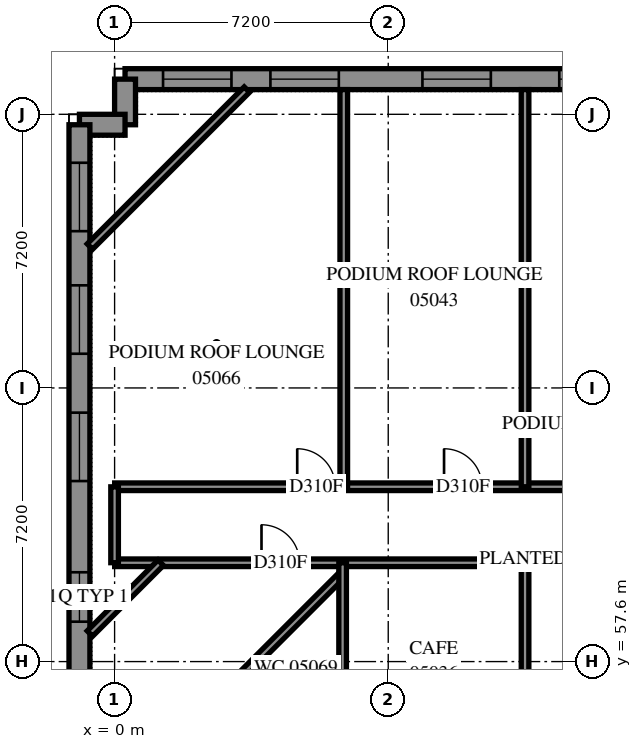
"""IFC4 building model, lengths in metres.
Left out: names, types, materials, properties, quantities, classifications, styles, units other than length and angle.
Written with IfcOpenShell. Run it as: python <this file> out.ifc"""

import sys

from ifc_helpers import new_model, si_unit, direction, frame, frame_2d, origin, place, context, subcontext, project, spatial, polyline, rectangle, outline, extrude, element, fill, save


model = new_model("IFC4")
c1 = context("Model", 3, precision=1e-05, world=origin(), true_north=direction((0.0, 1.0)))
c2 = subcontext(c1, "Body", "Model", "MODEL_VIEW")
j1 = project(units=[si_unit("LENGTHUNIT", "METRE"), si_unit("PLANEANGLEUNIT", "RADIAN")], contexts=[c1])
p1 = place(None, origin())
s1 = spatial("IfcSite", under=j1, at=p1, CompositionType="ELEMENT")
p2 = place(p1, origin())
s2 = spatial("IfcBuilding", under=s1, at=p2, CompositionType="ELEMENT")
p3 = place(p2, frame((0.0, 0.0, 22.8)))
s3 = spatial("IfcBuildingStorey", under=s2, at=p3, CompositionType="ELEMENT", Elevation=22.8)
p4 = place(p3, frame((79.583, 72.925, 0.0), z_axis=(0.0, 0.0, 1.0), x_axis=(-1.0, 0.0, 0.0)))
e1 = element("IfcWall", 1, at=p4, inside=s3, PredefinedType="SOLIDWALL", context=c2, shape_type="SweptSolid", body=[
    extrude(outline(polyline([(-0.114, -0.275), (79.583, -0.275), (79.033, 0.275), (0.114, 0.275), (-0.114, -0.275)])), origin(), (0.0, 0.0, 1.0), 3.9),
])
p5 = place(p4, frame((1.249, 0.0, 0.7)))
e2 = element("IfcOpeningElement", 2, at=p5, cuts=e1, PredefinedType="OPENING", context=c2, shape_type="SweptSolid", body=[
    extrude(rectangle(XDim=1.8, YDim=2.4, at=frame_2d((0.9, 1.2))), frame((0.0, 0.285, 0.0), z_axis=(0.0, -1.0, 0.0), x_axis=(1.0, 0.0, 0.0)), (0.0, 0.0, 1.0), 0.57),
])
p6 = place(p4, frame((4.883, 0.0, 0.7)))
e3 = element("IfcOpeningElement", 3, at=p6, cuts=e1, PredefinedType="OPENING", context=c2, shape_type="SweptSolid", body=[
    extrude(rectangle(XDim=1.8, YDim=2.4, at=frame_2d((0.9, 1.2))), frame((0.0, 0.285, 0.0), z_axis=(0.0, -1.0, 0.0), x_axis=(1.0, 0.0, 0.0)), (0.0, 0.0, 1.0), 0.57),
])
p7 = place(p4, frame((8.483, 0.0, 0.7)))
e4 = element("IfcOpeningElement", 4, at=p7, cuts=e1, PredefinedType="OPENING", context=c2, shape_type="SweptSolid", body=[
    extrude(rectangle(XDim=1.8, YDim=2.4, at=frame_2d((0.9, 1.2))), frame((0.0, 0.285, 0.0), z_axis=(0.0, -1.0, 0.0), x_axis=(1.0, 0.0, 0.0)), (0.0, 0.0, 1.0), 0.57),
])
p8 = place(p4, frame((12.083, 0.0, 0.7)))
e5 = element("IfcOpeningElement", 5, at=p8, cuts=e1, PredefinedType="OPENING", context=c2, shape_type="SweptSolid", body=[
    extrude(rectangle(XDim=1.8, YDim=2.4, at=frame_2d((0.9, 1.2))), frame((0.0, 0.285, 0.0), z_axis=(0.0, -1.0, 0.0), x_axis=(1.0, 0.0, 0.0)), (0.0, 0.0, 1.0), 0.57),
])
p9 = place(p4, frame((15.683, 0.0, 0.7)))
e6 = element("IfcOpeningElement", 6, at=p9, cuts=e1, PredefinedType="OPENING", context=c2, shape_type="SweptSolid", body=[
    extrude(rectangle(XDim=1.8, YDim=2.4, at=frame_2d((0.9, 1.2))), frame((0.0, 0.285, 0.0), z_axis=(0.0, -1.0, 0.0), x_axis=(1.0, 0.0, 0.0)), (0.0, 0.0, 1.0), 0.57),
])
p10 = place(p4, frame((19.283, 0.0, 0.7)))
e7 = element("IfcOpeningElement", 7, at=p10, cuts=e1, PredefinedType="OPENING", context=c2, shape_type="SweptSolid", body=[
    extrude(rectangle(XDim=1.8, YDim=2.4, at=frame_2d((0.9, 1.2))), frame((0.0, 0.285, 0.0), z_axis=(0.0, -1.0, 0.0), x_axis=(1.0, 0.0, 0.0)), (0.0, 0.0, 1.0), 0.57),
])
p11 = place(p4, frame((22.883, 0.0, 0.7)))
e8 = element("IfcOpeningElement", 8, at=p11, cuts=e1, PredefinedType="OPENING", context=c2, shape_type="SweptSolid", body=[
    extrude(rectangle(XDim=1.8, YDim=2.4, at=frame_2d((0.9, 1.2))), frame((0.0, 0.285, 0.0), z_axis=(0.0, -1.0, 0.0), x_axis=(1.0, 0.0, 0.0)), (0.0, 0.0, 1.0), 0.57),
])
p12 = place(p4, frame((26.483, 0.0, 0.7)))
e9 = element("IfcOpeningElement", 9, at=p12, cuts=e1, PredefinedType="OPENING", context=c2, shape_type="SweptSolid", body=[
    extrude(rectangle(XDim=1.8, YDim=2.4, at=frame_2d((0.9, 1.2))), frame((0.0, 0.285, 0.0), z_axis=(0.0, -1.0, 0.0), x_axis=(1.0, 0.0, 0.0)), (0.0, 0.0, 1.0), 0.57),
])
p13 = place(p4, frame((30.083, 0.0, 0.7)))
e10 = element("IfcOpeningElement", 10, at=p13, cuts=e1, PredefinedType="OPENING", context=c2, shape_type="SweptSolid", body=[
    extrude(rectangle(XDim=1.8, YDim=2.4, at=frame_2d((0.9, 1.2))), frame((0.0, 0.285, 0.0), z_axis=(0.0, -1.0, 0.0), x_axis=(1.0, 0.0, 0.0)), (0.0, 0.0, 1.0), 0.57),
])
p14 = place(p4, frame((33.683, 0.0, 0.7)))
e11 = element("IfcOpeningElement", 11, at=p14, cuts=e1, PredefinedType="OPENING", context=c2, shape_type="SweptSolid", body=[
    extrude(rectangle(XDim=1.8, YDim=2.4, at=frame_2d((0.9, 1.2))), frame((0.0, 0.285, 0.0), z_axis=(0.0, -1.0, 0.0), x_axis=(1.0, 0.0, 0.0)), (0.0, 0.0, 1.0), 0.57),
])
p15 = place(p4, frame((37.283, 0.0, 0.7)))
e12 = element("IfcOpeningElement", 12, at=p15, cuts=e1, PredefinedType="OPENING", context=c2, shape_type="SweptSolid", body=[
    extrude(rectangle(XDim=1.8, YDim=2.4, at=frame_2d((0.9, 1.2))), frame((0.0, 0.285, 0.0), z_axis=(0.0, -1.0, 0.0), x_axis=(1.0, 0.0, 0.0)), (0.0, 0.0, 1.0), 0.57),
])
p16 = place(p4, frame((40.883, 0.0, 0.7)))
e13 = element("IfcOpeningElement", 13, at=p16, cuts=e1, PredefinedType="OPENING", context=c2, shape_type="SweptSolid", body=[
    extrude(rectangle(XDim=1.8, YDim=2.4, at=frame_2d((0.9, 1.2))), frame((0.0, 0.285, 0.0), z_axis=(0.0, -1.0, 0.0), x_axis=(1.0, 0.0, 0.0)), (0.0, 0.0, 1.0), 0.57),
])
p17 = place(p4, frame((44.483, 0.0, 0.7)))
e14 = element("IfcOpeningElement", 14, at=p17, cuts=e1, PredefinedType="OPENING", context=c2, shape_type="SweptSolid", body=[
    extrude(rectangle(XDim=1.8, YDim=2.4, at=frame_2d((0.9, 1.2))), frame((0.0, 0.285, 0.0), z_axis=(0.0, -1.0, 0.0), x_axis=(1.0, 0.0, 0.0)), (0.0, 0.0, 1.0), 0.57),
])
p18 = place(p4, frame((48.083, 0.0, 0.7)))
e15 = element("IfcOpeningElement", 15, at=p18, cuts=e1, PredefinedType="OPENING", context=c2, shape_type="SweptSolid", body=[
    extrude(rectangle(XDim=1.8, YDim=2.4, at=frame_2d((0.9, 1.2))), frame((0.0, 0.285, 0.0), z_axis=(0.0, -1.0, 0.0), x_axis=(1.0, 0.0, 0.0)), (0.0, 0.0, 1.0), 0.57),
])
p19 = place(p4, frame((51.683, 0.0, 0.7)))
e16 = element("IfcOpeningElement", 16, at=p19, cuts=e1, PredefinedType="OPENING", context=c2, shape_type="SweptSolid", body=[
    extrude(rectangle(XDim=1.8, YDim=2.4, at=frame_2d((0.9, 1.2))), frame((0.0, 0.285, 0.0), z_axis=(0.0, -1.0, 0.0), x_axis=(1.0, 0.0, 0.0)), (0.0, 0.0, 1.0), 0.57),
])
p20 = place(p4, frame((55.283, 0.0, 0.7)))
e17 = element("IfcOpeningElement", 17, at=p20, cuts=e1, PredefinedType="OPENING", context=c2, shape_type="SweptSolid", body=[
    extrude(rectangle(XDim=1.8, YDim=2.4, at=frame_2d((0.9, 1.2))), frame((0.0, 0.285, 0.0), z_axis=(0.0, -1.0, 0.0), x_axis=(1.0, 0.0, 0.0)), (0.0, 0.0, 1.0), 0.57),
])
p21 = place(p4, frame((58.883, 0.0, 0.7)))
e18 = element("IfcOpeningElement", 18, at=p21, cuts=e1, PredefinedType="OPENING", context=c2, shape_type="SweptSolid", body=[
    extrude(rectangle(XDim=1.8, YDim=2.4, at=frame_2d((0.9, 1.2))), frame((0.0, 0.285, 0.0), z_axis=(0.0, -1.0, 0.0), x_axis=(1.0, 0.0, 0.0)), (0.0, 0.0, 1.0), 0.57),
])
p22 = place(p4, frame((62.483, 0.0, 0.7)))
e19 = element("IfcOpeningElement", 19, at=p22, cuts=e1, PredefinedType="OPENING", context=c2, shape_type="SweptSolid", body=[
    extrude(rectangle(XDim=1.8, YDim=2.4, at=frame_2d((0.9, 1.2))), frame((0.0, 0.285, 0.0), z_axis=(0.0, -1.0, 0.0), x_axis=(1.0, 0.0, 0.0)), (0.0, 0.0, 1.0), 0.57),
])
p23 = place(p4, frame((66.083, 0.0, 0.7)))
e20 = element("IfcOpeningElement", 20, at=p23, cuts=e1, PredefinedType="OPENING", context=c2, shape_type="SweptSolid", body=[
    extrude(rectangle(XDim=1.8, YDim=2.4, at=frame_2d((0.9, 1.2))), frame((0.0, 0.285, 0.0), z_axis=(0.0, -1.0, 0.0), x_axis=(1.0, 0.0, 0.0)), (0.0, 0.0, 1.0), 0.57),
])
p24 = place(p4, frame((69.683, 0.0, 0.7)))
e21 = element("IfcOpeningElement", 21, at=p24, cuts=e1, PredefinedType="OPENING", context=c2, shape_type="SweptSolid", body=[
    extrude(rectangle(XDim=1.8, YDim=2.4, at=frame_2d((0.9, 1.2))), frame((0.0, 0.285, 0.0), z_axis=(0.0, -1.0, 0.0), x_axis=(1.0, 0.0, 0.0)), (0.0, 0.0, 1.0), 0.57),
])
p25 = place(p4, frame((73.683, 0.0, 0.7)))
e22 = element("IfcOpeningElement", 22, at=p25, cuts=e1, PredefinedType="OPENING", context=c2, shape_type="SweptSolid", body=[
    extrude(rectangle(XDim=1.8, YDim=2.4, at=frame_2d((0.9, 1.2))), frame((0.0, 0.285, 0.0), z_axis=(0.0, -1.0, 0.0), x_axis=(1.0, 0.0, 0.0)), (0.0, 0.0, 1.0), 0.57),
])
p26 = place(p4, frame((76.508, 0.0, 0.7)))
e23 = element("IfcOpeningElement", 23, at=p26, cuts=e1, PredefinedType="OPENING", context=c2, shape_type="SweptSolid", body=[
    extrude(rectangle(XDim=1.8, YDim=2.4, at=frame_2d((0.9, 1.2))), frame((0.0, 0.285, 0.0), z_axis=(0.0, -1.0, 0.0), x_axis=(1.0, 0.0, 0.0)), (0.0, 0.0, 1.0), 0.57),
])
p27 = place(p3, frame((0.275, 72.925, 0.0), z_axis=(0.0, 0.0, 1.0), x_axis=(0.0, -1.0, 0.0)))
e24 = element("IfcWall", 24, at=p27, inside=s3, PredefinedType="SOLIDWALL", context=c2, shape_type="SweptSolid", body=[
    extrude(outline(polyline([(-0.275, -0.275), (0.925, -0.275), (1.475, 0.275), (0.275, 0.275), (-0.275, -0.275)])), origin(), (0.0, 0.0, 1.0), 3.9),
])
p28 = place(p3, frame((0.275, 71.725, 0.0), z_axis=(0.0, 0.0, 1.0), x_axis=(-1.0, 0.0, 0.0)))
e25 = element("IfcWall", 25, at=p28, inside=s3, PredefinedType="SOLIDWALL", context=c2, shape_type="SweptSolid", body=[
    extrude(outline(polyline([(0.275, -0.275), (1.475, -0.275), (0.925, 0.275), (-0.275, 0.275), (0.275, -0.275)])), origin(), (0.0, 0.0, 1.0), 3.9),
])
p29 = place(p3, frame((-0.925, 71.725, 0.0), z_axis=(0.0, 0.0, 1.0), x_axis=(0.0, -1.0, 0.0)))
e26 = element("IfcWall", 26, at=p29, inside=s3, PredefinedType="SOLIDWALL", context=c2, shape_type="SweptSolid", body=[
    extrude(outline(polyline([(-0.275, -0.275), (28.525, -0.275), (27.975, 0.275), (0.275, 0.275), (-0.275, -0.275)])), origin(), (0.0, 0.0, 1.0), 3.9),
])
p30 = place(p29, frame((1.0, 0.0, 0.7)))
e27 = element("IfcOpeningElement", 27, at=p30, cuts=e26, PredefinedType="OPENING", context=c2, shape_type="SweptSolid", body=[
    extrude(rectangle(XDim=1.8, YDim=2.4, at=frame_2d((0.9, 1.2))), frame((0.0, 0.285, 0.0), z_axis=(0.0, -1.0, 0.0), x_axis=(1.0, 0.0, 0.0)), (0.0, 0.0, 1.0), 0.57),
])
p31 = place(p29, frame((4.225, 0.0, 0.7)))
e28 = element("IfcOpeningElement", 28, at=p31, cuts=e26, PredefinedType="OPENING", context=c2, shape_type="SweptSolid", body=[
    extrude(rectangle(XDim=1.8, YDim=2.4, at=frame_2d((0.9, 1.2))), frame((0.0, 0.285, 0.0), z_axis=(0.0, -1.0, 0.0), x_axis=(1.0, 0.0, 0.0)), (0.0, 0.0, 1.0), 0.57),
])
p32 = place(p29, frame((7.575, 0.0, 0.7)))
e29 = element("IfcOpeningElement", 29, at=p32, cuts=e26, PredefinedType="OPENING", context=c2, shape_type="SweptSolid", body=[
    extrude(rectangle(XDim=1.8, YDim=2.4, at=frame_2d((0.9, 1.2))), frame((0.0, 0.285, 0.0), z_axis=(0.0, -1.0, 0.0), x_axis=(1.0, 0.0, 0.0)), (0.0, 0.0, 1.0), 0.57),
])
p33 = place(p29, frame((14.775, 0.0, 0.7)))
e30 = element("IfcOpeningElement", 30, at=p33, cuts=e26, PredefinedType="OPENING", context=c2, shape_type="SweptSolid", body=[
    extrude(rectangle(XDim=1.8, YDim=2.4, at=frame_2d((0.9, 1.2))), frame((0.0, 0.285, 0.0), z_axis=(0.0, -1.0, 0.0), x_axis=(1.0, 0.0, 0.0)), (0.0, 0.0, 1.0), 0.57),
])
p34 = place(p29, frame((18.875, 0.0, 0.7)))
e31 = element("IfcOpeningElement", 31, at=p34, cuts=e26, PredefinedType="OPENING", context=c2, shape_type="SweptSolid", body=[
    extrude(rectangle(XDim=1.8, YDim=2.4, at=frame_2d((0.9, 1.2))), frame((0.0, 0.285, 0.0), z_axis=(0.0, -1.0, 0.0), x_axis=(1.0, 0.0, 0.0)), (0.0, 0.0, 1.0), 0.57),
])
p35 = place(p29, frame((21.625, 0.0, 0.7)))
e32 = element("IfcOpeningElement", 32, at=p35, cuts=e26, PredefinedType="OPENING", context=c2, shape_type="SweptSolid", body=[
    extrude(rectangle(XDim=1.8, YDim=2.4, at=frame_2d((0.9, 1.2))), frame((0.0, 0.285, 0.0), z_axis=(0.0, -1.0, 0.0), x_axis=(1.0, 0.0, 0.0)), (0.0, 0.0, 1.0), 0.57),
])
p36 = place(p29, frame((25.45, 0.0, 0.7)))
e33 = element("IfcOpeningElement", 33, at=p36, cuts=e26, PredefinedType="OPENING", context=c2, shape_type="SweptSolid", body=[
    extrude(rectangle(XDim=1.8, YDim=2.4, at=frame_2d((0.9, 1.2))), frame((0.0, 0.285, 0.0), z_axis=(0.0, -1.0, 0.0), x_axis=(1.0, 0.0, 0.0)), (0.0, 0.0, 1.0), 0.57),
])
p37 = place(p29, frame((11.775, 0.0, 0.45)))
e34 = element("IfcOpeningElement", 34, at=p37, cuts=e26, PredefinedType="OPENING", context=c2, shape_type="SweptSolid", body=[
    extrude(rectangle(XDim=1.3, YDim=2.5, at=frame_2d((0.65, 1.25))), frame((0.0, 0.285, 0.0), z_axis=(0.0, -1.0, 0.0), x_axis=(1.0, 0.0, 0.0)), (0.0, 0.0, 1.0), 0.57),
])
p38 = place(p3, frame((0.002, 60.2, 0.0), z_axis=(0.0, 0.0, 1.0), x_axis=(1.0, 0.0, 0.0)))
e35 = element("IfcWall", 35, at=p38, inside=s3, PredefinedType="PARTITIONING", context=c2, shape_type="SweptSolid", body=[
    extrude(rectangle(XDim=54.598, YDim=0.2, at=frame_2d((27.299, 0.0))), origin(), (0.0, 0.0, 1.0), 3.9),
])
p39 = place(p38, frame((3.863, 0.0, 0.0)))
e36 = element("IfcOpeningElement", 36, at=p39, cuts=e35, PredefinedType="OPENING", context=c2, shape_type="SweptSolid", body=[
    extrude(rectangle(XDim=1.0, YDim=2.1, at=frame_2d((0.5, 1.05))), frame((0.0, 0.11, 0.0), z_axis=(0.0, -1.0, 0.0), x_axis=(1.0, 0.0, 0.0)), (0.0, 0.0, 1.0), 0.22),
])
p40 = place(p3, frame((0.002, 62.2, 0.0), z_axis=(0.0, 0.0, 1.0), x_axis=(1.0, 0.0, 0.0)))
e37 = element("IfcWall", 37, at=p40, inside=s3, PredefinedType="PARTITIONING", context=c2, shape_type="SweptSolid", body=[
    extrude(rectangle(XDim=54.598, YDim=0.2, at=frame_2d((27.299, 0.0))), origin(), (0.0, 0.0, 1.0), 3.9),
])
p41 = place(p40, frame((8.667, 0.0, 0.0)))
e38 = element("IfcOpeningElement", 38, at=p41, cuts=e37, PredefinedType="OPENING", context=c2, shape_type="SweptSolid", body=[
    extrude(rectangle(XDim=1.0, YDim=2.1, at=frame_2d((0.5, 1.05))), frame((0.0, 0.11, 0.0), z_axis=(0.0, -1.0, 0.0), x_axis=(1.0, 0.0, 0.0)), (0.0, 0.0, 1.0), 0.22),
])
p42 = place(p40, frame((13.136, 0.0, 0.0)))
e39 = element("IfcOpeningElement", 39, at=p42, cuts=e37, PredefinedType="OPENING", context=c2, shape_type="SweptSolid", body=[
    extrude(rectangle(XDim=1.0, YDim=2.1, at=frame_2d((0.5, 1.05))), frame((0.0, 0.11, 0.0), z_axis=(0.0, -1.0, 0.0), x_axis=(1.0, 0.0, 0.0)), (0.0, 0.0, 1.0), 0.22),
])
p43 = place(p40, frame((20.335, 0.0, 0.0)))
e40 = element("IfcOpeningElement", 40, at=p43, cuts=e37, PredefinedType="OPENING", context=c2, shape_type="SweptSolid", body=[
    extrude(rectangle(XDim=1.0, YDim=2.1, at=frame_2d((0.5, 1.05))), frame((0.0, 0.11, 0.0), z_axis=(0.0, -1.0, 0.0), x_axis=(1.0, 0.0, 0.0)), (0.0, 0.0, 1.0), 0.22),
])
p44 = place(p40, frame((27.535, 0.0, 0.0)))
e41 = element("IfcOpeningElement", 41, at=p44, cuts=e37, PredefinedType="OPENING", context=c2, shape_type="SweptSolid", body=[
    extrude(rectangle(XDim=1.0, YDim=2.1, at=frame_2d((0.5, 1.05))), frame((0.0, 0.11, 0.0), z_axis=(0.0, -1.0, 0.0), x_axis=(1.0, 0.0, 0.0)), (0.0, 0.0, 1.0), 0.22),
])
p45 = place(p40, frame((34.736, 0.0, 0.0)))
e42 = element("IfcOpeningElement", 42, at=p45, cuts=e37, PredefinedType="OPENING", context=c2, shape_type="SweptSolid", body=[
    extrude(rectangle(XDim=1.0, YDim=2.1, at=frame_2d((0.5, 1.05))), frame((0.0, 0.11, 0.0), z_axis=(0.0, -1.0, 0.0), x_axis=(1.0, 0.0, 0.0)), (0.0, 0.0, 1.0), 0.22),
])
p46 = place(p40, frame((41.935, 0.0, 0.0)))
e43 = element("IfcOpeningElement", 43, at=p46, cuts=e37, PredefinedType="OPENING", context=c2, shape_type="SweptSolid", body=[
    extrude(rectangle(XDim=1.0, YDim=2.1, at=frame_2d((0.5, 1.05))), frame((0.0, 0.11, 0.0), z_axis=(0.0, -1.0, 0.0), x_axis=(1.0, 0.0, 0.0)), (0.0, 0.0, 1.0), 0.22),
])
p47 = place(p40, frame((49.136, 0.0, 0.0)))
e44 = element("IfcOpeningElement", 44, at=p47, cuts=e37, PredefinedType="OPENING", context=c2, shape_type="SweptSolid", body=[
    extrude(rectangle(XDim=1.0, YDim=2.1, at=frame_2d((0.5, 1.05))), frame((0.0, 0.11, 0.0), z_axis=(0.0, -1.0, 0.0), x_axis=(1.0, 0.0, 0.0)), (0.0, 0.0, 1.0), 0.22),
])
p48 = place(p40, frame((4.803, 0.0, 0.0)))
e45 = element("IfcOpeningElement", 45, at=p48, cuts=e37, PredefinedType="OPENING", context=c2, shape_type="SweptSolid", body=[
    extrude(rectangle(XDim=1.0, YDim=2.1, at=frame_2d((0.5, 1.05))), frame((0.0, 0.11, 0.0), z_axis=(0.0, -1.0, 0.0), x_axis=(1.0, 0.0, 0.0)), (0.0, 0.0, 1.0), 0.22),
])
for number, where, z_axis, x_axis in (
    (46, (6.03, 62.2, 0.0), (0.0, 0.0, 1.0), (0.0, 1.0, 0.0)),
    (47, (10.8, 62.2, 0.0), (0.0, 0.0, 1.0), (0.0, 1.0, 0.0)),
):
    element("IfcWall", number, at=place(p3, frame(where, z_axis=z_axis, x_axis=x_axis)), inside=s3, PredefinedType="PARTITIONING", context=c2, shape_type="SweptSolid", body=[
        extrude(rectangle(XDim=10.45, YDim=0.2, at=frame_2d((5.225, 0.0))), origin(), (0.0, 0.0, 1.0), 3.9),
    ])
p49 = place(p3, frame((1.105, 55.001, 0.0), z_axis=(0.0, 0.0, 1.0), x_axis=(0.7071067812, 0.7071067812, 0.0)))
e48 = element("IfcWall", 48, at=p49, inside=s3, PredefinedType="PARTITIONING", context=c2, shape_type="SweptSolid", body=[
    extrude(rectangle(XDim=6.921, YDim=0.2, at=frame_2d((3.461, 0.0))), origin(), (0.0, 0.0, 1.0), 3.9),
])
p50 = place(p3, frame((-0.65, 68.519, 0.0), z_axis=(0.0, 0.0, 1.0), x_axis=(0.7071067812, 0.7071067812, 0.0)))
e49 = element("IfcWall", 49, at=p50, inside=s3, PredefinedType="PARTITIONING", context=c2, shape_type="SweptSolid", body=[
    extrude(rectangle(XDim=5.842, YDim=0.2, at=frame_2d((2.921, 0.0))), origin(), (0.0, 0.0, 1.0), 3.9),
])
for number, where, z_axis, x_axis in (
    (50, (6.0, 55.0, 0.0), (0.0, 0.0, 1.0), (0.0, 1.0, 0.0)),
    (51, (10.8, 55.0, 0.0), (0.0, 0.0, 1.0), (0.0, 1.0, 0.0)),
):
    element("IfcWall", number, at=place(p3, frame(where, z_axis=z_axis, x_axis=x_axis)), inside=s3, PredefinedType="PARTITIONING", context=c2, shape_type="SweptSolid", body=[
        extrude(rectangle(XDim=5.2, YDim=0.2, at=frame_2d((2.6, 0.0))), origin(), (0.0, 0.0, 1.0), 3.9),
    ])
p51 = place(p3, frame((-0.65, 58.337, 0.0), z_axis=(0.0, 0.0, 1.0), x_axis=(0.7071067812, 0.7071067812, 0.0)))
e52 = element("IfcWall", 52, at=p51, inside=s3, PredefinedType="PARTITIONING", context=c2, shape_type="SweptSolid", body=[
    extrude(rectangle(XDim=2.635, YDim=0.2, at=frame_2d((1.318, 0.0))), origin(), (0.0, 0.0, 1.0), 3.9),
])
p52 = place(p3, frame((0.0, 60.202, 0.0), z_axis=(0.0, 0.0, 1.0), x_axis=(0.0, 1.0, 0.0)))
e53 = element("IfcWall", 53, at=p52, inside=s3, PredefinedType="PARTITIONING", context=c2, shape_type="SweptSolid", body=[
    extrude(rectangle(XDim=1.996, YDim=0.2, at=frame_2d((0.998, 0.0))), origin(), (0.0, 0.0, 1.0), 3.9),
])
p53 = place(p23, origin())
e54 = element("IfcWindow", 54, at=p53, inside=s3, PartitioningType="SINGLE_PANEL", PredefinedType="WINDOW", context=c2, shape_type="SweptSolid", body=[
    extrude(rectangle(XDim=1.8, YDim=2.4, at=frame_2d((0.9, 1.2))), frame((0.0, 0.155, 0.0), z_axis=(0.0, -1.0, 0.0), x_axis=(1.0, 0.0, 0.0)), (0.0, 0.0, 1.0), 0.06),
])
fill(e20, e54)
p54 = place(p24, origin())
e55 = element("IfcWindow", 55, at=p54, inside=s3, PartitioningType="SINGLE_PANEL", PredefinedType="WINDOW", context=c2, shape_type="SweptSolid", body=[
    extrude(rectangle(XDim=1.8, YDim=2.4, at=frame_2d((0.9, 1.2))), frame((0.0, 0.155, 0.0), z_axis=(0.0, -1.0, 0.0), x_axis=(1.0, 0.0, 0.0)), (0.0, 0.0, 1.0), 0.06),
])
fill(e21, e55)
p55 = place(p25, origin())
e56 = element("IfcWindow", 56, at=p55, inside=s3, PartitioningType="SINGLE_PANEL", PredefinedType="WINDOW", context=c2, shape_type="SweptSolid", body=[
    extrude(rectangle(XDim=1.8, YDim=2.4, at=frame_2d((0.9, 1.2))), frame((0.0, 0.155, 0.0), z_axis=(0.0, -1.0, 0.0), x_axis=(1.0, 0.0, 0.0)), (0.0, 0.0, 1.0), 0.06),
])
fill(e22, e56)
p56 = place(p26, origin())
e57 = element("IfcWindow", 57, at=p56, inside=s3, PartitioningType="SINGLE_PANEL", PredefinedType="WINDOW", context=c2, shape_type="SweptSolid", body=[
    extrude(rectangle(XDim=1.8, YDim=2.4, at=frame_2d((0.9, 1.2))), frame((0.0, 0.155, 0.0), z_axis=(0.0, -1.0, 0.0), x_axis=(1.0, 0.0, 0.0)), (0.0, 0.0, 1.0), 0.06),
])
fill(e23, e57)
p57 = place(p30, origin())
e58 = element("IfcWindow", 58, at=p57, inside=s3, PartitioningType="SINGLE_PANEL", PredefinedType="WINDOW", context=c2, shape_type="SweptSolid", body=[
    extrude(rectangle(XDim=1.8, YDim=2.4, at=frame_2d((0.9, 1.2))), frame((0.0, 0.155, 0.0), z_axis=(0.0, -1.0, 0.0), x_axis=(1.0, 0.0, 0.0)), (0.0, 0.0, 1.0), 0.06),
])
fill(e27, e58)
p58 = place(p31, origin())
e59 = element("IfcWindow", 59, at=p58, inside=s3, PartitioningType="SINGLE_PANEL", PredefinedType="WINDOW", context=c2, shape_type="SweptSolid", body=[
    extrude(rectangle(XDim=1.8, YDim=2.4, at=frame_2d((0.9, 1.2))), frame((0.0, 0.155, 0.0), z_axis=(0.0, -1.0, 0.0), x_axis=(1.0, 0.0, 0.0)), (0.0, 0.0, 1.0), 0.06),
])
fill(e28, e59)
p59 = place(p32, origin())
e60 = element("IfcWindow", 60, at=p59, inside=s3, PartitioningType="SINGLE_PANEL", PredefinedType="WINDOW", context=c2, shape_type="SweptSolid", body=[
    extrude(rectangle(XDim=1.8, YDim=2.4, at=frame_2d((0.9, 1.2))), frame((0.0, 0.155, 0.0), z_axis=(0.0, -1.0, 0.0), x_axis=(1.0, 0.0, 0.0)), (0.0, 0.0, 1.0), 0.06),
])
fill(e29, e60)
p60 = place(p41, origin())
e61 = element("IfcDoor", 61, at=p60, inside=s3, OperationType="SINGLE_SWING_RIGHT", PredefinedType="DOOR", context=c2, shape_type="SweptSolid", body=[
    extrude(rectangle(XDim=1.0, YDim=2.1, at=frame_2d((0.5, 1.05))), frame((0.0, 0.025, 0.0), z_axis=(0.0, -1.0, 0.0), x_axis=(1.0, 0.0, 0.0)), (0.0, 0.0, 1.0), 0.05),
])
fill(e38, e61)
p61 = place(p48, origin())
e62 = element("IfcDoor", 62, at=p61, inside=s3, OperationType="SINGLE_SWING_LEFT", PredefinedType="DOOR", context=c2, shape_type="SweptSolid", body=[
    extrude(rectangle(XDim=1.0, YDim=2.1, at=frame_2d((0.5, 1.05))), frame((0.0, 0.025, 0.0), z_axis=(0.0, -1.0, 0.0), x_axis=(1.0, 0.0, 0.0)), (0.0, 0.0, 1.0), 0.05),
])
fill(e45, e62)
p62 = place(p39, origin())
e63 = element("IfcDoor", 63, at=p62, inside=s3, OperationType="SINGLE_SWING_LEFT", PredefinedType="DOOR", context=c2, shape_type="SweptSolid", body=[
    extrude(rectangle(XDim=1.0, YDim=2.1, at=frame_2d((0.5, 1.05))), frame((0.0, 0.025, 0.0), z_axis=(0.0, -1.0, 0.0), x_axis=(1.0, 0.0, 0.0)), (0.0, 0.0, 1.0), 0.05),
])
fill(e36, e63)
p63 = place(p37, origin())
e64 = element("IfcWindow", 64, at=p63, inside=s3, PartitioningType="SINGLE_PANEL", PredefinedType="WINDOW", context=c2, shape_type="SweptSolid", body=[
    extrude(rectangle(XDim=1.3, YDim=2.5, at=frame_2d((0.65, 1.25))), frame((0.0, 0.155, 0.0), z_axis=(0.0, -1.0, 0.0), x_axis=(1.0, 0.0, 0.0)), (0.0, 0.0, 1.0), 0.06),
])
fill(e34, e64)
save(model, sys.argv[1])
